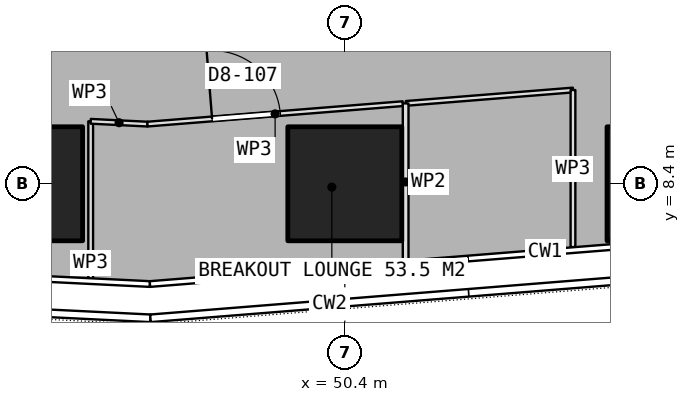
"""IFC4 building model, lengths in metres.
Left out: names, types, materials, properties, quantities, classifications, styles, units other than length and angle.
Written with IfcOpenShell. Run it as: python <this file> out.ifc"""

import sys

from ifc_helpers import new_model, si_unit, direction, frame, frame_2d, origin, origin_2d, place, context, subcontext, project, spatial, rectangle, extrude, element, fill, save


model = new_model("IFC4")
c1 = context("Model", 3, precision=1e-05, world=origin(), true_north=direction((0.0, 1.0)))
c2 = subcontext(c1, "Body", "Model", "MODEL_VIEW")
j1 = project(units=[si_unit("LENGTHUNIT", "METRE"), si_unit("PLANEANGLEUNIT", "RADIAN")], contexts=[c1])
p1 = place(None, origin())
s1 = spatial("IfcSite", under=j1, at=p1, CompositionType="ELEMENT")
p2 = place(p1, origin())
s2 = spatial("IfcBuilding", under=s1, at=p2, CompositionType="ELEMENT")
p3 = place(p2, frame((0.0, 0.0, 81.65)))
s3 = spatial("IfcBuildingStorey", under=s2, at=p3, CompositionType="ELEMENT", Elevation=81.65)
for number, where, z_axis, x_axis in (
    (1, (42.0, 8.4, 0.0), (0.0, 0.0, 1.0), (1.0, 0.0, 0.0)),
    (2, (50.4, 8.4, 0.0), (0.0, 0.0, 1.0), (1.0, 0.0, 0.0)),
    (3, (58.8, 8.4, 0.0), (0.0, 0.0, 1.0), (1.0, 0.0, 0.0)),
):
    element("IfcColumn", number, at=place(p3, frame(where, z_axis=z_axis, x_axis=x_axis)), inside=s3, PredefinedType="COLUMN", context=c2, shape_type="SweptSolid", body=[
        extrude(rectangle(XDim=3.0, YDim=3.0, at=origin_2d()), origin(), (0.0, 0.0, 1.0), 3.75),
    ])
p4 = place(p3, frame((43.713, 5.889, 0.0), z_axis=(0.0, 0.0, 1.0), x_axis=(0.0, 1.0, 0.0)))
e4 = element("IfcWall", 4, at=p4, inside=s3, PredefinedType="PARTITIONING", context=c2, shape_type="SweptSolid", body=[
    extrude(rectangle(XDim=4.155, YDim=0.125, at=frame_2d((2.078, 0.0))), origin(), (0.0, 0.0, 1.0), 3.4),
])
p5 = place(p3, frame((43.713, 10.044, 0.0), z_axis=(0.0, 0.0, 1.0), x_axis=(0.998775040451, -0.049481497262, 0.0)))
e5 = element("IfcWall", 5, at=p5, inside=s3, PredefinedType="PARTITIONING", context=c2, shape_type="SweptSolid", body=[
    extrude(rectangle(XDim=1.495, YDim=0.125, at=frame_2d((0.748, 0.0))), origin(), (0.0, 0.0, 1.0), 3.4),
])
p6 = place(p3, frame((45.206, 9.97, 0.0), z_axis=(0.0, 0.0, 1.0), x_axis=(0.996809518435, 0.079817190868, 0.0)))
e6 = element("IfcWall", 6, at=p6, inside=s3, PredefinedType="PARTITIONING", context=c2, shape_type="SweptSolid", body=[
    extrude(rectangle(XDim=6.741, YDim=0.125, at=frame_2d((3.371, 0.0))), origin(), (0.0, 0.0, 1.0), 3.4),
])
p7 = place(p6, frame((1.707, 0.0, 0.0)))
e7 = element("IfcOpeningElement", 7, at=p7, cuts=e6, PredefinedType="OPENING", context=c2, shape_type="SweptSolid", body=[
    extrude(rectangle(XDim=1.8, YDim=2.1, at=frame_2d((0.9, 1.05))), frame((0.0, 0.073, 0.0), z_axis=(0.0, -1.0, 0.0), x_axis=(1.0, 0.0, 0.0)), (0.0, 0.0, 1.0), 0.145),
])
p8 = place(p3, frame((52.011, 10.515, 0.0), z_axis=(0.0, 0.0, 1.0), x_axis=(0.996804348419, 0.079881731156, 0.0)))
e8 = element("IfcWall", 8, at=p8, inside=s3, PredefinedType="PARTITIONING", context=c2, shape_type="SweptSolid", body=[
    extrude(rectangle(XDim=4.407, YDim=0.125, at=frame_2d((2.204, 0.0))), origin(), (0.0, 0.0, 1.0), 3.4),
])
p9 = place(p3, frame((56.404, 10.867, 0.0), z_axis=(0.0, 0.0, 1.0), x_axis=(0.0, -1.0, 0.0)))
e9 = element("IfcWall", 9, at=p9, inside=s3, PredefinedType="PARTITIONING", context=c2, shape_type="SweptSolid", body=[
    extrude(rectangle(XDim=4.133, YDim=0.125, at=frame_2d((2.066, 0.0))), origin(), (0.0, 0.0, 1.0), 3.4),
])
p10 = place(p3, frame((52.001, 10.515, 0.0), z_axis=(0.0, 0.0, 1.0), x_axis=(0.0, -1.0, 0.0)))
e10 = element("IfcWall", 10, at=p10, inside=s3, PredefinedType="PARTITIONING", context=c2, shape_type="SweptSolid", body=[
    extrude(rectangle(XDim=4.134, YDim=0.15, at=frame_2d((2.067, 0.0))), origin(), (0.0, 0.0, 1.0), 3.4),
])
p11 = place(p7, origin())
e11 = element("IfcDoor", 11, at=p11, inside=s3, OperationType="DOUBLE_DOOR_SINGLE_SWING", PredefinedType="DOOR", context=c2, shape_type="SweptSolid", body=[
    extrude(rectangle(XDim=1.8, YDim=2.1, at=frame_2d((0.9, 1.05))), frame((0.0, 0.025, 0.0), z_axis=(0.0, -1.0, 0.0), x_axis=(1.0, 0.0, 0.0)), (0.0, 0.0, 1.0), 0.05),
])
fill(e7, e11)
save(model, sys.argv[1])
